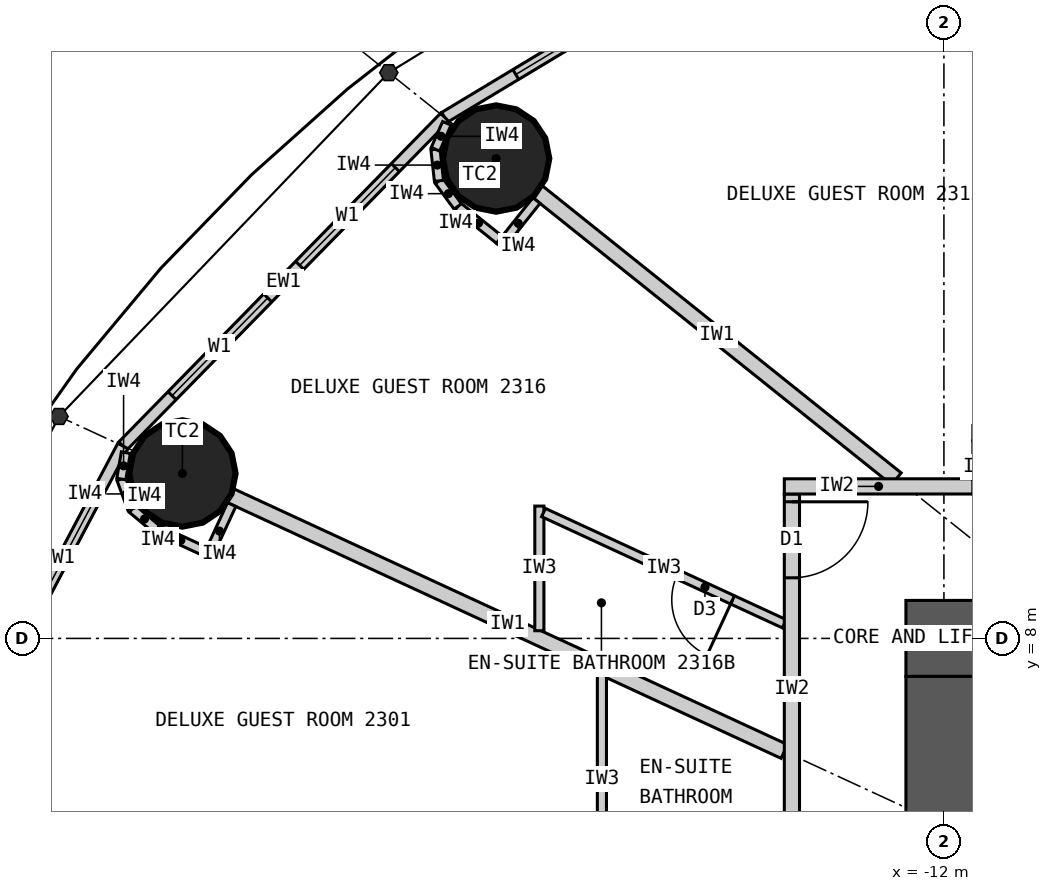
"""IFC4 building model, lengths in metres.
Left out: names, types, materials, properties, quantities, classifications, styles, units other than length and angle.
Written with IfcOpenShell. Run it as: python <this file> out.ifc"""

import sys

from ifc_helpers import new_model, si_unit, direction, frame, frame_2d, origin, origin_2d, place, context, subcontext, project, spatial, rectangle, circle, extrude, clip, halfspace, element, fill, save


model = new_model("IFC4")
c1 = context("Model", 3, precision=1e-05, world=origin(), true_north=direction((0.0, 1.0)))
c2 = subcontext(c1, "Body", "Model", "MODEL_VIEW")
j1 = project(units=[si_unit("LENGTHUNIT", "METRE"), si_unit("PLANEANGLEUNIT", "RADIAN")], contexts=[c1])
p1 = place(None, origin())
s1 = spatial("IfcSite", under=j1, at=p1, CompositionType="ELEMENT")
p2 = place(p1, origin())
s2 = spatial("IfcBuilding", under=s1, at=p2, CompositionType="ELEMENT")
p3 = place(p2, frame((0.0, 0.0, 90.3)))
s3 = spatial("IfcBuildingStorey", under=s2, at=p3, CompositionType="ELEMENT", Elevation=90.3)
for number, where, z_axis, x_axis in (
    (1, (-17.892, 14.313, 0.0), (0.0, 0.0, 1.0), (1.0, 0.0, 0.0)),
    (2, (-22.019, 10.17, 0.0), (0.0, 0.0, 1.0), (1.0, 0.0, 0.0)),
):
    element("IfcColumn", number, at=place(p3, frame(where, z_axis=z_axis, x_axis=x_axis)), inside=s3, PredefinedType="COLUMN", context=c2, shape_type="Clipping", body=[
        clip(extrude(circle(Radius=0.7, at=origin_2d()), origin(), (0.0, 0.0, 1.0), 3.3), halfspace(frame((0.0, 0.0, 2.25), z_axis=(0.0, 0.0, 1.0), x_axis=(1.0, 0.0, 0.0)), False)),
    ])
p4 = place(p3, frame((-12.5, 8.0, 0.0), z_axis=(0.0, 0.0, 1.0), x_axis=(1.0, 0.0, 0.0)))
e3 = element("IfcWall", 3, at=p4, inside=s3, PredefinedType="SHEAR", context=c2, shape_type="SweptSolid", body=[
    extrude(rectangle(XDim=25.0, YDim=1.0, at=frame_2d((12.5, 0.0))), origin(), (0.0, 0.0, 1.0), 3.3),
])
p5 = place(p4, frame((11.2, 0.0, 0.0)))
e4 = element("IfcOpeningElement", 4, at=p5, cuts=e3, PredefinedType="OPENING", context=c2, shape_type="SweptSolid", body=[
    extrude(rectangle(XDim=1.2, YDim=2.2, at=frame_2d((0.6, 1.1))), frame((0.0, 0.51, 0.0), z_axis=(0.0, -1.0, 0.0), x_axis=(1.0, 0.0, 0.0)), (0.0, 0.0, 1.0), 1.02),
])
p6 = place(p4, frame((18.8, 0.0, 0.0)))
e5 = element("IfcOpeningElement", 5, at=p6, cuts=e3, PredefinedType="OPENING", context=c2, shape_type="SweptSolid", body=[
    extrude(rectangle(XDim=0.9, YDim=2.2, at=frame_2d((0.45, 1.1))), frame((0.0, 0.51, 0.0), z_axis=(0.0, -1.0, 0.0), x_axis=(1.0, 0.0, 0.0)), (0.0, 0.0, 1.0), 1.02),
])
p7 = place(p3, frame((-12.0, 7.5, 0.0), z_axis=(0.0, 0.0, 1.0), x_axis=(0.0, -1.0, 0.0)))
e6 = element("IfcWall", 6, at=p7, inside=s3, PredefinedType="SHEAR", context=c2, shape_type="SweptSolid", body=[
    extrude(rectangle(XDim=15.0, YDim=1.0, at=frame_2d((7.5, 0.0))), origin(), (0.0, 0.0, 1.0), 3.3),
])
p8 = place(p7, frame((6.6, 0.0, 0.0)))
e7 = element("IfcOpeningElement", 7, at=p8, cuts=e6, PredefinedType="OPENING", context=c2, shape_type="SweptSolid", body=[
    extrude(rectangle(XDim=1.8, YDim=2.2, at=frame_2d((0.9, 1.1))), frame((0.0, 0.51, 0.0), z_axis=(0.0, -1.0, 0.0), x_axis=(1.0, 0.0, 0.0)), (0.0, 0.0, 1.0), 1.02),
])
p9 = place(p3, frame((-13.096, 18.147, 0.0), z_axis=(0.0, 0.0, 1.0), x_axis=(-0.856983180864, -0.515344377787, 0.0)))
e8 = element("IfcWall", 8, at=p9, inside=s3, PredefinedType="ELEMENTEDWALL", context=c2, shape_type="SweptSolid", body=[
    extrude(rectangle(XDim=6.386, YDim=0.15, at=frame_2d((3.193, 0.0))), origin(), (0.0, 0.0, 1.0), 3.05),
])
p10 = place(p9, frame((1.093, 0.0, 0.9)))
e9 = element("IfcOpeningElement", 9, at=p10, cuts=e8, PredefinedType="OPENING", context=c2, shape_type="SweptSolid", body=[
    extrude(rectangle(XDim=1.8, YDim=1.9, at=frame_2d((0.9, 0.95))), frame((0.0, 0.085, 0.0), z_axis=(0.0, -1.0, 0.0), x_axis=(1.0, 0.0, 0.0)), (0.0, 0.0, 1.0), 0.17),
])
p11 = place(p9, frame((3.493, 0.0, 0.9)))
e10 = element("IfcOpeningElement", 10, at=p11, cuts=e8, PredefinedType="OPENING", context=c2, shape_type="SweptSolid", body=[
    extrude(rectangle(XDim=1.8, YDim=1.9, at=frame_2d((0.9, 0.95))), frame((0.0, 0.085, 0.0), z_axis=(0.0, -1.0, 0.0), x_axis=(1.0, 0.0, 0.0)), (0.0, 0.0, 1.0), 0.17),
])
p12 = place(p3, frame((-18.57, 14.856, 0.0), z_axis=(0.0, 0.0, 1.0), x_axis=(-0.699602905915, -0.714531856557, 0.0)))
e11 = element("IfcWall", 11, at=p12, inside=s3, PredefinedType="ELEMENTEDWALL", context=c2, shape_type="SweptSolid", body=[
    extrude(rectangle(XDim=6.051, YDim=0.15, at=frame_2d((3.025, 0.0))), origin(), (0.0, 0.0, 1.0), 3.05),
])
p13 = place(p12, frame((0.926, 0.0, 0.9)))
e12 = element("IfcOpeningElement", 12, at=p13, cuts=e11, PredefinedType="OPENING", context=c2, shape_type="SweptSolid", body=[
    extrude(rectangle(XDim=1.8, YDim=1.9, at=frame_2d((0.9, 0.95))), frame((0.0, 0.085, 0.0), z_axis=(0.0, -1.0, 0.0), x_axis=(1.0, 0.0, 0.0)), (0.0, 0.0, 1.0), 0.17),
])
p14 = place(p12, frame((3.325, 0.0, 0.9)))
e13 = element("IfcOpeningElement", 13, at=p14, cuts=e11, PredefinedType="OPENING", context=c2, shape_type="SweptSolid", body=[
    extrude(rectangle(XDim=1.8, YDim=1.9, at=frame_2d((0.9, 0.95))), frame((0.0, 0.085, 0.0), z_axis=(0.0, -1.0, 0.0), x_axis=(1.0, 0.0, 0.0)), (0.0, 0.0, 1.0), 0.17),
])
p15 = place(p3, frame((-22.803, 10.532, 0.0), z_axis=(0.0, 0.0, 1.0), x_axis=(-0.467296867008, -0.884100468321, 0.0)))
e14 = element("IfcWall", 14, at=p15, inside=s3, PredefinedType="ELEMENTEDWALL", context=c2, shape_type="SweptSolid", body=[
    extrude(rectangle(XDim=5.734, YDim=0.15, at=frame_2d((2.867, 0.0))), origin(), (0.0, 0.0, 1.0), 3.05),
])
p16 = place(p15, frame((0.767, 0.0, 0.9)))
e15 = element("IfcOpeningElement", 15, at=p16, cuts=e14, PredefinedType="OPENING", context=c2, shape_type="SweptSolid", body=[
    extrude(rectangle(XDim=1.8, YDim=1.9, at=frame_2d((0.9, 0.95))), frame((0.0, 0.085, 0.0), z_axis=(0.0, -1.0, 0.0), x_axis=(1.0, 0.0, 0.0)), (0.0, 0.0, 1.0), 0.17),
])
p17 = place(p15, frame((3.167, 0.0, 0.9)))
e16 = element("IfcOpeningElement", 16, at=p17, cuts=e14, PredefinedType="OPENING", context=c2, shape_type="SweptSolid", body=[
    extrude(rectangle(XDim=1.8, YDim=1.9, at=frame_2d((0.9, 0.95))), frame((0.0, 0.085, 0.0), z_axis=(0.0, -1.0, 0.0), x_axis=(1.0, 0.0, 0.0)), (0.0, 0.0, 1.0), 0.17),
])
p18 = place(p3, frame((-7.289, 10.1, 0.0), z_axis=(0.0, 0.0, 1.0), x_axis=(-0.585198353053, 0.810890182197, 0.0)))
e17 = element("IfcWall", 17, at=p18, inside=s3, PredefinedType="PARTITIONING", context=c2, shape_type="SweptSolid", body=[
    extrude(rectangle(XDim=8.36, YDim=0.2, at=frame_2d((4.18, 0.0))), origin(), (0.0, 0.0, 1.0), 2.15),
])
p19 = place(p3, frame((-12.625, 10.1, 0.0), z_axis=(0.0, 0.0, 1.0), x_axis=(-0.780892451574, 0.624665493744, 0.0)))
e18 = element("IfcWall", 18, at=p19, inside=s3, PredefinedType="PARTITIONING", context=c2, shape_type="SweptSolid", body=[
    extrude(rectangle(XDim=6.045, YDim=0.2, at=frame_2d((3.022, 0.0))), origin(), (0.0, 0.0, 1.0), 2.25),
])
p20 = place(p3, frame((-14.1, 6.512, 0.0), z_axis=(0.0, 0.0, 1.0), x_axis=(-0.907832871056, 0.419332181247, 0.0)))
e19 = element("IfcWall", 19, at=p20, inside=s3, PredefinedType="PARTITIONING", context=c2, shape_type="SweptSolid", body=[
    extrude(rectangle(XDim=8.023, YDim=0.2, at=frame_2d((4.011, 0.0))), origin(), (0.0, 0.0, 1.0), 2.15),
])
p21 = place(p3, frame((-16.5, 7.521, 0.0), z_axis=(0.0, 0.0, 1.0), x_axis=(0.0, -1.0, 0.0)))
e20 = element("IfcWall", 20, at=p21, inside=s3, PredefinedType="PARTITIONING", context=c2, shape_type="SweptSolid", body=[
    extrude(rectangle(XDim=2.749, YDim=0.12, at=frame_2d((1.374, 0.0))), origin(), (0.0, 0.0, 1.0), 3.05),
])
p22 = place(p3, frame((-17.323, 8.101, 0.0), z_axis=(0.0, 0.0, 1.0), x_axis=(0.0, 1.0, 0.0)))
e21 = element("IfcWall", 21, at=p22, inside=s3, PredefinedType="PARTITIONING", context=c2, shape_type="SweptSolid", body=[
    extrude(rectangle(XDim=1.64, YDim=0.12, at=frame_2d((0.82, 0.0))), origin(), (0.0, 0.0, 1.0), 3.05),
])
p23 = place(p3, frame((-14.1, 8.193, 0.0), z_axis=(0.0, 0.0, 1.0), x_axis=(-0.907836493557, 0.419324338628, 0.0)))
e22 = element("IfcWall", 22, at=p23, inside=s3, PredefinedType="PARTITIONING", context=c2, shape_type="SweptSolid", body=[
    extrude(rectangle(XDim=3.49, YDim=0.12, at=frame_2d((1.745, 0.0))), origin(), (0.0, 0.0, 1.0), 3.05),
])
p24 = place(p23, frame((0.75, 0.0, 0.0)))
e23 = element("IfcOpeningElement", 23, at=p24, cuts=e22, PredefinedType="OPENING", context=c2, shape_type="SweptSolid", body=[
    extrude(rectangle(XDim=0.8, YDim=2.1, at=frame_2d((0.4, 1.05))), frame((0.0, 0.07, 0.0), z_axis=(0.0, -1.0, 0.0), x_axis=(1.0, 0.0, 0.0)), (0.0, 0.0, 1.0), 0.14),
])
p25 = place(p3, frame((-14.0, 9.9, 0.0), z_axis=(0.0, 0.0, 1.0), x_axis=(0.0, -1.0, 0.0)))
e24 = element("IfcWall", 24, at=p25, inside=s3, PredefinedType="PARTITIONING", context=c2, shape_type="SweptSolid", body=[
    extrude(rectangle(XDim=5.127, YDim=0.2, at=frame_2d((2.564, 0.0))), origin(), (0.0, 0.0, 1.0), 3.05),
])
p26 = place(p25, frame((0.103, 0.0, 0.0)))
e25 = element("IfcOpeningElement", 25, at=p26, cuts=e24, PredefinedType="OPENING", context=c2, shape_type="SweptSolid", body=[
    extrude(rectangle(XDim=1.0, YDim=2.2, at=frame_2d((0.5, 1.1))), frame((0.0, 0.11, 0.0), z_axis=(0.0, -1.0, 0.0), x_axis=(1.0, 0.0, 0.0)), (0.0, 0.0, 1.0), 0.22),
])
p27 = place(p3, frame((-14.1, 10.0, 0.0), z_axis=(0.0, 0.0, 1.0), x_axis=(1.0, 0.0, 0.0)))
e26 = element("IfcWall", 26, at=p27, inside=s3, PredefinedType="PARTITIONING", context=c2, shape_type="SweptSolid", body=[
    extrude(rectangle(XDim=2.481, YDim=0.2, at=frame_2d((1.24, 0.0))), origin(), (0.0, 0.0, 1.0), 3.05),
])
p28 = place(p3, frame((-17.361, 13.76, 0.0), z_axis=(0.0, 0.0, 1.0), x_axis=(-0.624501042889, -0.781023973659, 0.0)))
e27 = element("IfcWall", 27, at=p28, inside=s3, PredefinedType="PARTITIONING", context=c2, shape_type="SweptSolid", body=[
    extrude(rectangle(XDim=0.767, YDim=0.12, at=frame_2d((0.384, 0.0))), origin(), (0.0, 0.0, 1.0), 3.05),
])
p29 = place(p3, frame((-17.85, 13.246, 0.0), z_axis=(0.0, 0.0, 1.0), x_axis=(-0.780902834923, 0.62465251333, 0.0)))
e28 = element("IfcWall", 28, at=p29, inside=s3, PredefinedType="PARTITIONING", context=c2, shape_type="SweptSolid", body=[
    extrude(rectangle(XDim=0.7, YDim=0.12, at=frame_2d((0.35, 0.0))), origin(), (0.0, 0.0, 1.0), 3.05),
])
for number, where, z_axis, x_axis in (
    (29, (-18.396, 13.683, 0.0), (0.0, 0.0, 1.0), (-0.592, 0.806, 0.0)),
    (30, (-18.644, 14.02, 0.0), (0.0, 0.0, 1.0), (-0.11, 0.994, 0.0)),
):
    element("IfcWall", number, at=place(p3, frame(where, z_axis=z_axis, x_axis=x_axis)), inside=s3, PredefinedType="PARTITIONING", context=c2, shape_type="SweptSolid", body=[
        extrude(rectangle(XDim=0.418, YDim=0.12, at=frame_2d((0.209, 0.0))), origin(), (0.0, 0.0, 1.0), 3.05),
    ])
p30 = place(p3, frame((-18.69, 14.435, 0.0), z_axis=(0.0, 0.0, 1.0), x_axis=(0.401093412634, 0.91603715773, 0.0)))
e31 = element("IfcWall", 31, at=p30, inside=s3, PredefinedType="PARTITIONING", context=c2, shape_type="SweptSolid", body=[
    extrude(rectangle(XDim=0.373, YDim=0.12, at=frame_2d((0.187, 0.0))), origin(), (0.0, 0.0, 1.0), 3.05),
])
p31 = place(p3, frame((-21.371, 9.761, 0.0), z_axis=(0.0, 0.0, 1.0), x_axis=(-0.419259891039, -0.907866258744, 0.0)))
e32 = element("IfcWall", 32, at=p31, inside=s3, PredefinedType="PARTITIONING", context=c2, shape_type="SweptSolid", body=[
    extrude(rectangle(XDim=0.768, YDim=0.12, at=frame_2d((0.384, 0.0))), origin(), (0.0, 0.0, 1.0), 3.05),
])
p32 = place(p3, frame((-21.722, 9.144, 0.0), z_axis=(0.0, 0.0, 1.0), x_axis=(-0.907877701396, 0.419235112208, 0.0)))
e33 = element("IfcWall", 33, at=p32, inside=s3, PredefinedType="PARTITIONING", context=c2, shape_type="SweptSolid", body=[
    extrude(rectangle(XDim=0.7, YDim=0.12, at=frame_2d((0.35, 0.0))), origin(), (0.0, 0.0, 1.0), 3.05),
])
p33 = place(p3, frame((-22.358, 9.437, 0.0), z_axis=(0.0, 0.0, 1.0), x_axis=(-0.768412687942, 0.639954639806, 0.0)))
e34 = element("IfcWall", 34, at=p33, inside=s3, PredefinedType="PARTITIONING", context=c2, shape_type="SweptSolid", body=[
    extrude(rectangle(XDim=0.418, YDim=0.12, at=frame_2d((0.209, 0.0))), origin(), (0.0, 0.0, 1.0), 3.05),
])
p34 = place(p3, frame((-22.679, 9.705, 0.0), z_axis=(0.0, 0.0, 1.0), x_axis=(-0.345164001646, 0.938542386879, 0.0)))
e35 = element("IfcWall", 35, at=p34, inside=s3, PredefinedType="PARTITIONING", context=c2, shape_type="SweptSolid", body=[
    extrude(rectangle(XDim=0.418, YDim=0.12, at=frame_2d((0.209, 0.0))), origin(), (0.0, 0.0, 1.0), 3.05),
])
p35 = place(p3, frame((-22.823, 10.097, 0.0), z_axis=(0.0, 0.0, 1.0), x_axis=(0.169674995186, 0.985500074079, 0.0)))
e36 = element("IfcWall", 36, at=p35, inside=s3, PredefinedType="PARTITIONING", context=c2, shape_type="SweptSolid", body=[
    extrude(rectangle(XDim=0.353, YDim=0.12, at=frame_2d((0.176, 0.0))), origin(), (0.0, 0.0, 1.0), 3.05),
])
p36 = place(p11, origin())
e37 = element("IfcWindow", 37, at=p36, inside=s3, PartitioningType="SINGLE_PANEL", PredefinedType="WINDOW", context=c2, shape_type="SweptSolid", body=[
    extrude(rectangle(XDim=1.8, YDim=1.9, at=frame_2d((0.9, 0.95))), frame((0.0, 0.03, 0.0), z_axis=(0.0, -1.0, 0.0), x_axis=(1.0, 0.0, 0.0)), (0.0, 0.0, 1.0), 0.06),
])
fill(e10, e37)
p37 = place(p13, origin())
e38 = element("IfcWindow", 38, at=p37, inside=s3, PartitioningType="SINGLE_PANEL", PredefinedType="WINDOW", context=c2, shape_type="SweptSolid", body=[
    extrude(rectangle(XDim=1.8, YDim=1.9, at=frame_2d((0.9, 0.95))), frame((0.0, 0.03, 0.0), z_axis=(0.0, -1.0, 0.0), x_axis=(1.0, 0.0, 0.0)), (0.0, 0.0, 1.0), 0.06),
])
fill(e12, e38)
p38 = place(p14, origin())
e39 = element("IfcWindow", 39, at=p38, inside=s3, PartitioningType="SINGLE_PANEL", PredefinedType="WINDOW", context=c2, shape_type="SweptSolid", body=[
    extrude(rectangle(XDim=1.8, YDim=1.9, at=frame_2d((0.9, 0.95))), frame((0.0, 0.03, 0.0), z_axis=(0.0, -1.0, 0.0), x_axis=(1.0, 0.0, 0.0)), (0.0, 0.0, 1.0), 0.06),
])
fill(e13, e39)
p39 = place(p16, origin())
e40 = element("IfcWindow", 40, at=p39, inside=s3, PartitioningType="SINGLE_PANEL", PredefinedType="WINDOW", context=c2, shape_type="SweptSolid", body=[
    extrude(rectangle(XDim=1.8, YDim=1.9, at=frame_2d((0.9, 0.95))), frame((0.0, 0.03, 0.0), z_axis=(0.0, -1.0, 0.0), x_axis=(1.0, 0.0, 0.0)), (0.0, 0.0, 1.0), 0.06),
])
fill(e15, e40)
p40 = place(p24, origin())
e41 = element("IfcDoor", 41, at=p40, inside=s3, OperationType="SINGLE_SWING_LEFT", PredefinedType="DOOR", context=c2, shape_type="SweptSolid", body=[
    extrude(rectangle(XDim=0.8, YDim=2.1, at=frame_2d((0.4, 1.05))), frame((0.0, 0.025, 0.0), z_axis=(0.0, -1.0, 0.0), x_axis=(1.0, 0.0, 0.0)), (0.0, 0.0, 1.0), 0.05),
])
fill(e23, e41)
p41 = place(p26, origin())
e42 = element("IfcDoor", 42, at=p41, inside=s3, OperationType="SINGLE_SWING_LEFT", PredefinedType="DOOR", context=c2, shape_type="SweptSolid", body=[
    extrude(rectangle(XDim=1.0, YDim=2.2, at=frame_2d((0.5, 1.1))), frame((0.0, 0.025, 0.0), z_axis=(0.0, -1.0, 0.0), x_axis=(1.0, 0.0, 0.0)), (0.0, 0.0, 1.0), 0.05),
])
fill(e25, e42)
save(model, sys.argv[1])
